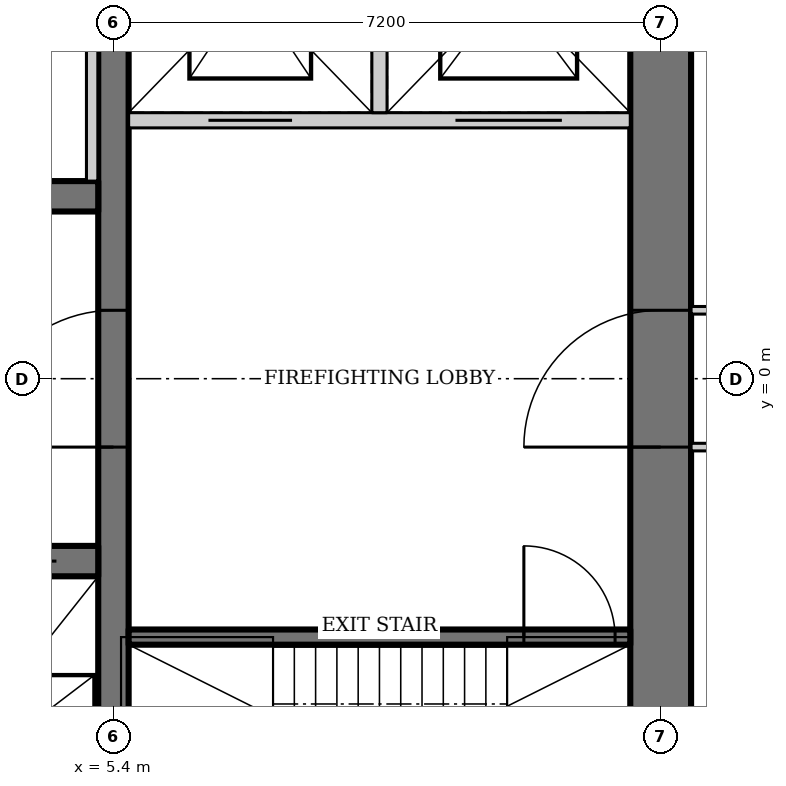
"""IFC4 building model, lengths in metres.
Left out: names, types, materials, properties, quantities, classifications, styles, units other than length and angle.
Written with IfcOpenShell. Run it as: python <this file> out.ifc"""

import sys

from ifc_helpers import new_model, si_unit, direction, frame, frame_2d, origin, place, context, subcontext, project, spatial, rectangle, extrude, element, fill, save


model = new_model("IFC4")
c1 = context("Model", 3, precision=1e-05, world=origin(), true_north=direction((0.0, 1.0)))
c2 = subcontext(c1, "Body", "Model", "MODEL_VIEW")
j1 = project(units=[si_unit("LENGTHUNIT", "METRE"), si_unit("PLANEANGLEUNIT", "RADIAN")], contexts=[c1])
p1 = place(None, origin())
s1 = spatial("IfcSite", under=j1, at=p1, CompositionType="ELEMENT")
p2 = place(p1, origin())
s2 = spatial("IfcBuilding", under=s1, at=p2, CompositionType="ELEMENT")
p3 = place(p2, frame((0.0, 0.0, 257.8)))
s3 = spatial("IfcBuildingStorey", under=s2, at=p3, CompositionType="ELEMENT", Elevation=257.8)
p4 = place(p3, frame((12.6, -11.0, 0.0), z_axis=(0.0, 0.0, 1.0), x_axis=(0.0, 1.0, 0.0)))
e1 = element("IfcWall", 1, at=p4, inside=s3, PredefinedType="SHEAR", context=c2, shape_type="SweptSolid", body=[
    extrude(rectangle(XDim=22.0, YDim=0.8, at=frame_2d((11.0, 0.0))), origin(), (0.0, 0.0, 1.0), 4.2),
])
p5 = place(p4, frame((10.1, 0.0, 0.0)))
e2 = element("IfcOpeningElement", 2, at=p5, cuts=e1, PredefinedType="OPENING", context=c2, shape_type="SweptSolid", body=[
    extrude(rectangle(XDim=1.8, YDim=2.1, at=frame_2d((0.9, 1.05))), frame((0.0, 0.41, 0.0), z_axis=(0.0, -1.0, 0.0), x_axis=(1.0, 0.0, 0.0)), (0.0, 0.0, 1.0), 0.82),
])
p6 = place(p3, frame((5.4, -6.8, 0.0), z_axis=(0.0, 0.0, 1.0), x_axis=(0.0, 1.0, 0.0)))
e3 = element("IfcWall", 3, at=p6, inside=s3, PredefinedType="SHEAR", context=c2, shape_type="SweptSolid", body=[
    extrude(rectangle(XDim=14.6, YDim=0.4, at=frame_2d((7.3, 0.0))), origin(), (0.0, 0.0, 1.0), 4.2),
])
p7 = place(p6, frame((5.9, 0.0, 0.0)))
e4 = element("IfcOpeningElement", 4, at=p7, cuts=e3, PredefinedType="OPENING", context=c2, shape_type="SweptSolid", body=[
    extrude(rectangle(XDim=1.8, YDim=2.1, at=frame_2d((0.9, 1.05))), frame((0.0, 0.21, 0.0), z_axis=(0.0, -1.0, 0.0), x_axis=(1.0, 0.0, 0.0)), (0.0, 0.0, 1.0), 0.42),
])
p8 = place(p3, frame((-5.2, -2.4, 0.0), z_axis=(0.0, 0.0, 1.0), x_axis=(1.0, 0.0, 0.0)))
e5 = element("IfcWall", 5, at=p8, inside=s3, PredefinedType="SHEAR", context=c2, shape_type="SweptSolid", body=[
    extrude(rectangle(XDim=10.4, YDim=0.4, at=frame_2d((5.2, 0.0))), origin(), (0.0, 0.0, 1.0), 4.2),
])
p9 = place(p8, frame((1.683, 0.0, 0.0)))
e6 = element("IfcOpeningElement", 6, at=p9, cuts=e5, PredefinedType="OPENING", context=c2, shape_type="SweptSolid", body=[
    extrude(rectangle(XDim=1.1, YDim=2.2, at=frame_2d((0.55, 1.1))), frame((0.0, 0.21, 0.0), z_axis=(0.0, -1.0, 0.0), x_axis=(1.0, 0.0, 0.0)), (0.0, 0.0, 1.0), 0.42),
])
p10 = place(p8, frame((5.217, 0.0, 0.0)))
e7 = element("IfcOpeningElement", 7, at=p10, cuts=e5, PredefinedType="OPENING", context=c2, shape_type="SweptSolid", body=[
    extrude(rectangle(XDim=1.1, YDim=2.2, at=frame_2d((0.55, 1.1))), frame((0.0, 0.21, 0.0), z_axis=(0.0, -1.0, 0.0), x_axis=(1.0, 0.0, 0.0)), (0.0, 0.0, 1.0), 0.42),
])
p11 = place(p8, frame((8.75, 0.0, 0.0)))
e8 = element("IfcOpeningElement", 8, at=p11, cuts=e5, PredefinedType="OPENING", context=c2, shape_type="SweptSolid", body=[
    extrude(rectangle(XDim=1.1, YDim=2.2, at=frame_2d((0.55, 1.1))), frame((0.0, 0.21, 0.0), z_axis=(0.0, -1.0, 0.0), x_axis=(1.0, 0.0, 0.0)), (0.0, 0.0, 1.0), 0.42),
])
p12 = place(p3, frame((5.2, 2.4, 0.0), z_axis=(0.0, 0.0, 1.0), x_axis=(-1.0, 0.0, 0.0)))
e9 = element("IfcWall", 9, at=p12, inside=s3, PredefinedType="SHEAR", context=c2, shape_type="SweptSolid", body=[
    extrude(rectangle(XDim=10.4, YDim=0.4, at=frame_2d((5.2, 0.0))), origin(), (0.0, 0.0, 1.0), 4.2),
])
p13 = place(p3, frame((5.6, -3.4, 0.0), z_axis=(0.0, 0.0, 1.0), x_axis=(1.0, 0.0, 0.0)))
e10 = element("IfcWall", 10, at=p13, inside=s3, PredefinedType="SHEAR", context=c2, shape_type="SweptSolid", body=[
    extrude(rectangle(XDim=6.6, YDim=0.2, at=frame_2d((3.3, 0.0))), origin(), (0.0, 0.0, 1.0), 4.2),
])
p14 = place(p13, frame((5.2, 0.0, 0.0)))
e11 = element("IfcOpeningElement", 11, at=p14, cuts=e10, PredefinedType="OPENING", context=c2, shape_type="SweptSolid", body=[
    extrude(rectangle(XDim=1.2, YDim=2.1, at=frame_2d((0.6, 1.05))), frame((0.0, 0.11, 0.0), z_axis=(0.0, -1.0, 0.0), x_axis=(1.0, 0.0, 0.0)), (0.0, 0.0, 1.0), 0.22),
])
p15 = place(p3, frame((12.2, 3.4, 0.0), z_axis=(0.0, 0.0, 1.0), x_axis=(-1.0, 0.0, 0.0)))
e12 = element("IfcWall", 12, at=p15, inside=s3, PredefinedType="SOLIDWALL", context=c2, shape_type="SweptSolid", body=[
    extrude(rectangle(XDim=6.6, YDim=0.2, at=frame_2d((3.3, 0.0))), origin(), (0.0, 0.0, 1.0), 4.2),
])
p16 = place(p15, frame((4.45, 0.0, 0.0)))
e13 = element("IfcOpeningElement", 13, at=p16, cuts=e12, PredefinedType="OPENING", context=c2, shape_type="SweptSolid", body=[
    extrude(rectangle(XDim=1.1, YDim=2.2, at=frame_2d((0.55, 1.1))), frame((0.0, 0.11, 0.0), z_axis=(0.0, -1.0, 0.0), x_axis=(1.0, 0.0, 0.0)), (0.0, 0.0, 1.0), 0.22),
])
p17 = place(p15, frame((0.9, 0.0, 0.0)))
e14 = element("IfcOpeningElement", 14, at=p17, cuts=e12, PredefinedType="OPENING", context=c2, shape_type="SweptSolid", body=[
    extrude(rectangle(XDim=1.4, YDim=2.2, at=frame_2d((0.7, 1.1))), frame((0.0, 0.11, 0.0), z_axis=(0.0, -1.0, 0.0), x_axis=(1.0, 0.0, 0.0)), (0.0, 0.0, 1.0), 0.22),
])
p18 = place(p3, frame((8.9, 3.5, 0.0), z_axis=(0.0, 0.0, 1.0), x_axis=(0.0, 1.0, 0.0)))
e15 = element("IfcWall", 15, at=p18, inside=s3, PredefinedType="SOLIDWALL", context=c2, shape_type="SweptSolid", body=[
    extrude(rectangle(XDim=3.3, YDim=0.2, at=frame_2d((1.65, 0.0))), origin(), (0.0, 0.0, 1.0), 4.2),
])
p19 = place(p3, frame((5.12, 2.6, 0.0), z_axis=(0.0, 0.0, 1.0), x_axis=(0.0, 1.0, 0.0)))
e16 = element("IfcWall", 16, at=p19, inside=s3, PredefinedType="SOLIDWALL", context=c2, shape_type="SweptSolid", body=[
    extrude(rectangle(XDim=4.4, YDim=0.15, at=frame_2d((2.2, 0.0))), origin(), (0.0, 0.0, 1.0), 4.05),
])
p20 = place(p3, frame((13.0, -0.9, 0.0), z_axis=(0.0, 0.0, 1.0), x_axis=(1.0, 0.0, 0.0)))
e17 = element("IfcWall", 17, at=p20, inside=s3, PredefinedType="PARTITIONING", context=c2, shape_type="SweptSolid", body=[
    extrude(rectangle(XDim=2.165, YDim=0.1, at=frame_2d((1.083, 0.0))), origin(), (0.0, 0.0, 1.0), 4.05),
])
p21 = place(p20, frame((1.15, 0.0, 0.0)))
e18 = element("IfcOpeningElement", 18, at=p21, cuts=e17, PredefinedType="OPENING", context=c2, shape_type="SweptSolid", body=[
    extrude(rectangle(XDim=0.9, YDim=2.1, at=frame_2d((0.45, 1.05))), frame((0.0, 0.06, 0.0), z_axis=(0.0, -1.0, 0.0), x_axis=(1.0, 0.0, 0.0)), (0.0, 0.0, 1.0), 0.12),
])
p22 = place(p3, frame((15.165, 0.9, 0.0), z_axis=(0.0, 0.0, 1.0), x_axis=(-1.0, 0.0, 0.0)))
e19 = element("IfcWall", 19, at=p22, inside=s3, PredefinedType="PARTITIONING", context=c2, shape_type="SweptSolid", body=[
    extrude(rectangle(XDim=2.165, YDim=0.1, at=frame_2d((1.083, 0.0))), origin(), (0.0, 0.0, 1.0), 4.05),
])
p23 = place(p22, frame((0.1, 0.0, 0.0)))
e20 = element("IfcOpeningElement", 20, at=p23, cuts=e19, PredefinedType="OPENING", context=c2, shape_type="SweptSolid", body=[
    extrude(rectangle(XDim=0.9, YDim=2.1, at=frame_2d((0.45, 1.05))), frame((0.0, 0.06, 0.0), z_axis=(0.0, -1.0, 0.0), x_axis=(1.0, 0.0, 0.0)), (0.0, 0.0, 1.0), 0.12),
])
p24 = place(p7, origin())
e21 = element("IfcDoor", 21, at=p24, inside=s3, OperationType="DOUBLE_DOOR_DOUBLE_SWING", PredefinedType="DOOR", context=c2, shape_type="SweptSolid", body=[
    extrude(rectangle(XDim=1.8, YDim=2.1, at=frame_2d((0.9, 1.05))), frame((0.0, 0.025, 0.0), z_axis=(0.0, -1.0, 0.0), x_axis=(1.0, 0.0, 0.0)), (0.0, 0.0, 1.0), 0.05),
])
fill(e4, e21)
p25 = place(p14, origin())
e22 = element("IfcDoor", 22, at=p25, inside=s3, OperationType="SINGLE_SWING_RIGHT", PredefinedType="DOOR", context=c2, shape_type="SweptSolid", body=[
    extrude(rectangle(XDim=1.2, YDim=2.1, at=frame_2d((0.6, 1.05))), frame((0.0, 0.025, 0.0), z_axis=(0.0, -1.0, 0.0), x_axis=(1.0, 0.0, 0.0)), (0.0, 0.0, 1.0), 0.05),
])
fill(e11, e22)
p26 = place(p5, origin())
e23 = element("IfcDoor", 23, at=p26, inside=s3, OperationType="DOUBLE_DOOR_DOUBLE_SWING", PredefinedType="DOOR", context=c2, shape_type="SweptSolid", body=[
    extrude(rectangle(XDim=1.8, YDim=2.1, at=frame_2d((0.9, 1.05))), frame((0.0, 0.025, 0.0), z_axis=(0.0, -1.0, 0.0), x_axis=(1.0, 0.0, 0.0)), (0.0, 0.0, 1.0), 0.05),
])
fill(e2, e23)
p27 = place(p11, origin())
e24 = element("IfcDoor", 24, at=p27, inside=s3, OperationType="DOUBLE_DOOR_SLIDING", PredefinedType="DOOR", context=c2, shape_type="SweptSolid", body=[
    extrude(rectangle(XDim=1.1, YDim=2.2, at=frame_2d((0.55, 1.1))), frame((0.0, 0.025, 0.0), z_axis=(0.0, -1.0, 0.0), x_axis=(1.0, 0.0, 0.0)), (0.0, 0.0, 1.0), 0.05),
])
fill(e8, e24)
p28 = place(p16, origin())
e25 = element("IfcDoor", 25, at=p28, inside=s3, OperationType="DOUBLE_DOOR_SLIDING", PredefinedType="DOOR", context=c2, shape_type="SweptSolid", body=[
    extrude(rectangle(XDim=1.1, YDim=2.2, at=frame_2d((0.55, 1.1))), frame((0.0, 0.025, 0.0), z_axis=(0.0, -1.0, 0.0), x_axis=(1.0, 0.0, 0.0)), (0.0, 0.0, 1.0), 0.05),
])
fill(e13, e25)
p29 = place(p17, origin())
e26 = element("IfcDoor", 26, at=p29, inside=s3, OperationType="DOUBLE_DOOR_SLIDING", PredefinedType="DOOR", context=c2, shape_type="SweptSolid", body=[
    extrude(rectangle(XDim=1.4, YDim=2.2, at=frame_2d((0.7, 1.1))), frame((0.0, 0.025, 0.0), z_axis=(0.0, -1.0, 0.0), x_axis=(1.0, 0.0, 0.0)), (0.0, 0.0, 1.0), 0.05),
])
fill(e14, e26)
save(model, sys.argv[1])
